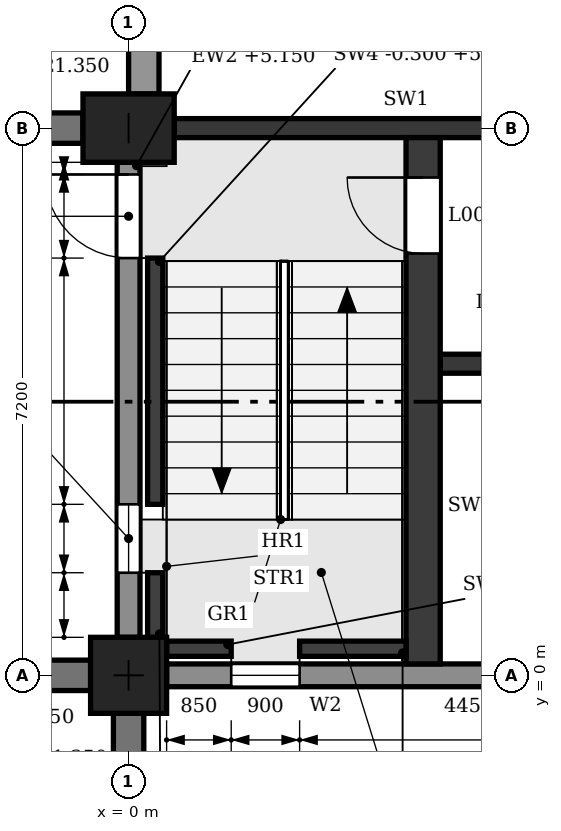
"""IFC4 building model, lengths in metres.
Left out: names, types, materials, properties, quantities, classifications, styles, units other than length and angle.
Written with IfcOpenShell. Run it as: python <this file> out.ifc"""

import sys

from ifc_helpers import new_model, si_unit, direction, frame, frame_2d, origin, origin_with_axes, origin_2d, place, context, subcontext, project, spatial, polyline, rectangle, outline, extrude, element, fill, save


model = new_model("IFC4")
c1 = context("Model", 3, precision=1e-05, world=origin(), true_north=direction((0.0, 1.0)))
c2 = subcontext(c1, "Body", "Model", "MODEL_VIEW")
j1 = project(units=[si_unit("LENGTHUNIT", "METRE"), si_unit("PLANEANGLEUNIT", "RADIAN")], contexts=[c1])
p1 = place(None, origin())
s1 = spatial("IfcSite", under=j1, at=p1, CompositionType="ELEMENT")
p2 = place(p1, origin())
s2 = spatial("IfcBuilding", under=s1, at=p2, CompositionType="ELEMENT")
p3 = place(p2, origin())
s3 = spatial("IfcBuildingStorey", under=s2, at=p3, CompositionType="ELEMENT", Elevation=0.0)
p4 = place(p3, origin_with_axes())
e1 = element("IfcColumn", 1, at=p4, inside=s3, PredefinedType="COLUMN", context=c2, shape_type="SweptSolid", body=[
    extrude(rectangle(XDim=1.0, YDim=1.0, at=origin_2d()), origin(), (0.0, 0.0, 1.0), 6.0),
])
p5 = place(p3, frame((0.0, 7.2, 0.0), z_axis=(0.0, 0.0, 1.0), x_axis=(1.0, 0.0, 0.0)))
e2 = element("IfcColumn", 2, at=p5, inside=s3, PredefinedType="COLUMN", context=c2, shape_type="SweptSolid", body=[
    extrude(rectangle(XDim=1.2, YDim=0.9, at=origin_2d()), origin(), (0.0, 0.0, 1.0), 6.0),
])
p6 = place(p3, frame((0.0, 0.5, 0.0), z_axis=(0.0, 0.0, 1.0), x_axis=(0.0, 1.0, 0.0)))
e3 = element("IfcWall", 3, at=p6, inside=s3, PredefinedType="STANDARD", context=c2, shape_type="SweptSolid", body=[
    extrude(rectangle(XDim=6.25, YDim=0.3, at=frame_2d((3.125, 0.0))), origin(), (0.0, 0.0, 1.0), 5.15),
])
p7 = place(p6, frame((4.99, 0.0, 0.0)))
e4 = element("IfcOpeningElement", 4, at=p7, cuts=e3, PredefinedType="OPENING", context=c2, shape_type="SweptSolid", body=[
    extrude(rectangle(XDim=1.1, YDim=2.1, at=frame_2d((0.55, 1.05))), frame((0.0, 0.16, 0.0), z_axis=(0.0, -1.0, 0.0), x_axis=(1.0, 0.0, 0.0)), (0.0, 0.0, 1.0), 0.32),
])
p8 = place(p6, frame((0.85, 0.0, 0.9)))
e5 = element("IfcOpeningElement", 5, at=p8, cuts=e3, PredefinedType="OPENING", context=c2, shape_type="SweptSolid", body=[
    extrude(outline(polyline([(0.0, 0.0), (0.9, 0.0), (0.9, 3.55), (0.45, 4.0), (0.0, 3.55), (0.0, 0.0)])), frame((0.0, 0.16, 0.0), z_axis=(0.0, -1.0, 0.0), x_axis=(1.0, 0.0, 0.0)), (0.0, 0.0, 1.0), 0.32),
])
p9 = place(p3, frame((0.5, 0.0, 0.0), z_axis=(0.0, 0.0, 1.0), x_axis=(1.0, 0.0, 0.0)))
e6 = element("IfcWall", 6, at=p9, inside=s3, PredefinedType="STANDARD", context=c2, shape_type="SweptSolid", body=[
    extrude(rectangle(XDim=6.2, YDim=0.3, at=frame_2d((3.1, 0.0))), origin(), (0.0, 0.0, 1.0), 5.15),
])
p10 = place(p9, frame((0.85, 0.0, 0.9)))
e7 = element("IfcOpeningElement", 7, at=p10, cuts=e6, PredefinedType="OPENING", context=c2, shape_type="SweptSolid", body=[
    extrude(outline(polyline([(0.0, 0.0), (0.9, 0.0), (0.9, 3.55), (0.45, 4.0), (0.0, 3.55), (0.0, 0.0)])), frame((0.0, 0.16, 0.0), z_axis=(0.0, -1.0, 0.0), x_axis=(1.0, 0.0, 0.0)), (0.0, 0.0, 1.0), 0.32),
])
p11 = place(p3, frame((0.2, 7.65, 0.0), z_axis=(0.0, 0.0, 1.0), x_axis=(0.0, 1.0, 0.0)))
e8 = element("IfcWall", 8, at=p11, inside=s3, PredefinedType="POLYGONAL", context=c2, shape_type="SweptSolid", body=[
    extrude(outline(polyline([(0.0, 0.0), (0.25, 0.0), (0.25, 3.2), (0.492, 3.433), (0.748, 3.651), (1.015, 3.854), (1.294, 4.041), (1.583, 4.211), (1.882, 4.365), (2.189, 4.501), (2.503, 4.619), (2.824, 4.719), (3.15, 4.8), (3.476, 4.719), (3.797, 4.619), (4.111, 4.501), (4.418, 4.365), (4.717, 4.211), (5.006, 4.041), (5.285, 3.854), (5.552, 3.651), (5.808, 3.433), (6.05, 3.2), (6.05, 0.0), (6.3, 0.0), (6.3, 5.15), (0.0, 5.15), (0.0, 0.0)])), frame((0.0, 0.2, 0.0), z_axis=(0.0, -1.0, 0.0), x_axis=(1.0, 0.0, 0.0)), (0.0, 0.0, 1.0), 0.4),
])
for number, where, z_axis, x_axis in (
    (9, (-0.5, 0.0, 0.0), (0.0, 0.0, 1.0), (-1.0, 0.0, 0.0)),
    (10, (0.0, -0.5, 0.0), (0.0, 0.0, 1.0), (0.0, -1.0, 0.0)),
    (11, (-0.6, 7.2, 0.0), (0.0, 0.0, 1.0), (-1.0, 0.0, 0.0)),
):
    element("IfcWall", number, at=place(p3, frame(where, z_axis=z_axis, x_axis=x_axis)), inside=s3, PredefinedType="POLYGONAL", context=c2, shape_type="SweptSolid", body=[
        extrude(outline(polyline([(1.2, 0.0), (1.2, 20.825), (0.85, 21.35), (0.0, 21.35), (0.0, 0.0), (1.2, 0.0)])), frame((0.0, 0.2, 0.0), z_axis=(0.0, -1.0, 0.0), x_axis=(1.0, 0.0, 0.0)), (0.0, 0.0, 1.0), 0.4),
    ])
p12 = place(p3, frame((0.6, 7.2, 0.0), z_axis=(0.0, 0.0, 1.0), x_axis=(1.0, 0.0, 0.0)))
e12 = element("IfcWall", 12, at=p12, inside=s3, PredefinedType="SHEAR", context=c2, shape_type="SweptSolid", body=[
    extrude(rectangle(XDim=6.1, YDim=0.25, at=frame_2d((3.05, 0.0))), origin(), (0.0, 0.0, 1.0), 5.0),
])
p13 = place(p12, frame((4.65, 0.0, 0.0)))
e13 = element("IfcOpeningElement", 13, at=p13, cuts=e12, PredefinedType="OPENING", context=c2, shape_type="SweptSolid", body=[
    extrude(rectangle(XDim=1.1, YDim=2.1, at=frame_2d((0.55, 1.05))), frame((0.0, 0.135, 0.0), z_axis=(0.0, -1.0, 0.0), x_axis=(1.0, 0.0, 0.0)), (0.0, 0.0, 1.0), 0.27),
])
p14 = place(p3, frame((0.35, 0.5, -0.3), z_axis=(0.0, 0.0, 1.0), x_axis=(0.0, 1.0, 0.0)))
e14 = element("IfcWall", 14, at=p14, inside=s3, PredefinedType="SHEAR", context=c2, shape_type="SweptSolid", body=[
    extrude(rectangle(XDim=0.85, YDim=0.2, at=frame_2d((0.425, 0.0))), origin(), (0.0, 0.0, 1.0), 6.05),
])
p15 = place(p3, frame((0.35, 2.25, -0.3), z_axis=(0.0, 0.0, 1.0), x_axis=(0.0, 1.0, 0.0)))
e15 = element("IfcWall", 15, at=p15, inside=s3, PredefinedType="SHEAR", context=c2, shape_type="SweptSolid", body=[
    extrude(rectangle(XDim=3.24, YDim=0.2, at=frame_2d((1.62, 0.0))), origin(), (0.0, 0.0, 1.0), 6.05),
])
p16 = place(p3, frame((0.5, 0.35, -0.3), z_axis=(0.0, 0.0, 1.0), x_axis=(1.0, 0.0, 0.0)))
e16 = element("IfcWall", 16, at=p16, inside=s3, PredefinedType="SHEAR", context=c2, shape_type="SweptSolid", body=[
    extrude(rectangle(XDim=0.85, YDim=0.2, at=frame_2d((0.425, 0.0))), origin(), (0.0, 0.0, 1.0), 6.05),
])
p17 = place(p3, frame((2.25, 0.35, -0.3), z_axis=(0.0, 0.0, 1.0), x_axis=(1.0, 0.0, 0.0)))
e17 = element("IfcWall", 17, at=p17, inside=s3, PredefinedType="SHEAR", context=c2, shape_type="SweptSolid", body=[
    extrude(rectangle(XDim=1.4, YDim=0.2, at=frame_2d((0.7, 0.0))), origin(), (0.0, 0.0, 1.0), 6.05),
])
p18 = place(p3, frame((3.875, 0.15, 0.0), z_axis=(0.0, 0.0, 1.0), x_axis=(0.0, 1.0, 0.0)))
e18 = element("IfcWall", 18, at=p18, inside=s3, PredefinedType="SHEAR", context=c2, shape_type="SweptSolid", body=[
    extrude(rectangle(XDim=6.925, YDim=0.45, at=frame_2d((3.462, 0.0))), origin(), (0.0, 0.0, 1.0), 5.75),
])
p19 = place(p18, frame((5.4, 0.0, 0.0)))
e19 = element("IfcOpeningElement", 19, at=p19, cuts=e18, PredefinedType="OPENING", context=c2, shape_type="SweptSolid", body=[
    extrude(rectangle(XDim=1.0, YDim=2.1, at=frame_2d((0.5, 1.05))), frame((0.0, 0.235, 0.0), z_axis=(0.0, -1.0, 0.0), x_axis=(1.0, 0.0, 0.0)), (0.0, 0.0, 1.0), 0.47),
])
p20 = place(p3, frame((4.1, 4.1, 0.0), z_axis=(0.0, 0.0, 1.0), x_axis=(1.0, 0.0, 0.0)))
e20 = element("IfcWall", 20, at=p20, inside=s3, PredefinedType="SHEAR", context=c2, shape_type="SweptSolid", body=[
    extrude(rectangle(XDim=2.975, YDim=0.25, at=frame_2d((1.487, 0.0))), origin(), (0.0, 0.0, 1.0), 5.75),
])
p21 = place(p20, frame((0.55, 0.0, 0.0)))
e21 = element("IfcOpeningElement", 21, at=p21, cuts=e20, PredefinedType="OPENING", context=c2, shape_type="SweptSolid", body=[
    extrude(rectangle(XDim=0.9, YDim=2.1, at=frame_2d((0.45, 1.05))), frame((0.0, 0.135, 0.0), z_axis=(0.0, -1.0, 0.0), x_axis=(1.0, 0.0, 0.0)), (0.0, 0.0, 1.0), 0.27),
])
p22 = place(p7, origin())
e22 = element("IfcDoor", 22, at=p22, inside=s3, OperationType="SINGLE_SWING_RIGHT", PredefinedType="DOOR", context=c2, shape_type="SweptSolid", body=[
    extrude(rectangle(XDim=1.1, YDim=2.1, at=frame_2d((0.55, 1.05))), frame((0.0, 0.025, 0.0), z_axis=(0.0, -1.0, 0.0), x_axis=(1.0, 0.0, 0.0)), (0.0, 0.0, 1.0), 0.05),
])
fill(e4, e22)
p23 = place(p10, origin())
e23 = element("IfcWindow", 23, at=p23, inside=s3, PartitioningType="SINGLE_PANEL", PredefinedType="WINDOW", context=c2, shape_type="SweptSolid", body=[
    extrude(outline(polyline([(0.0, 0.0), (0.9, 0.0), (0.9, 3.55), (0.45, 4.0), (0.0, 3.55), (0.0, 0.0)])), frame((0.0, 0.03, 0.0), z_axis=(0.0, -1.0, 0.0), x_axis=(1.0, 0.0, 0.0)), (0.0, 0.0, 1.0), 0.06),
])
fill(e7, e23)
p24 = place(p8, origin())
e24 = element("IfcWindow", 24, at=p24, inside=s3, PartitioningType="SINGLE_PANEL", PredefinedType="WINDOW", context=c2, shape_type="SweptSolid", body=[
    extrude(outline(polyline([(0.0, 0.0), (0.9, 0.0), (0.9, 3.55), (0.45, 4.0), (0.0, 3.55), (0.0, 0.0)])), frame((0.0, 0.03, 0.0), z_axis=(0.0, -1.0, 0.0), x_axis=(1.0, 0.0, 0.0)), (0.0, 0.0, 1.0), 0.06),
])
fill(e5, e24)
p25 = place(p19, origin())
e25 = element("IfcDoor", 25, at=p25, inside=s3, OperationType="SINGLE_SWING_RIGHT", PredefinedType="DOOR", context=c2, shape_type="SweptSolid", body=[
    extrude(rectangle(XDim=1.0, YDim=2.1, at=frame_2d((0.5, 1.05))), frame((0.0, 0.025, 0.0), z_axis=(0.0, -1.0, 0.0), x_axis=(1.0, 0.0, 0.0)), (0.0, 0.0, 1.0), 0.05),
])
fill(e19, e25)
save(model, sys.argv[1])
